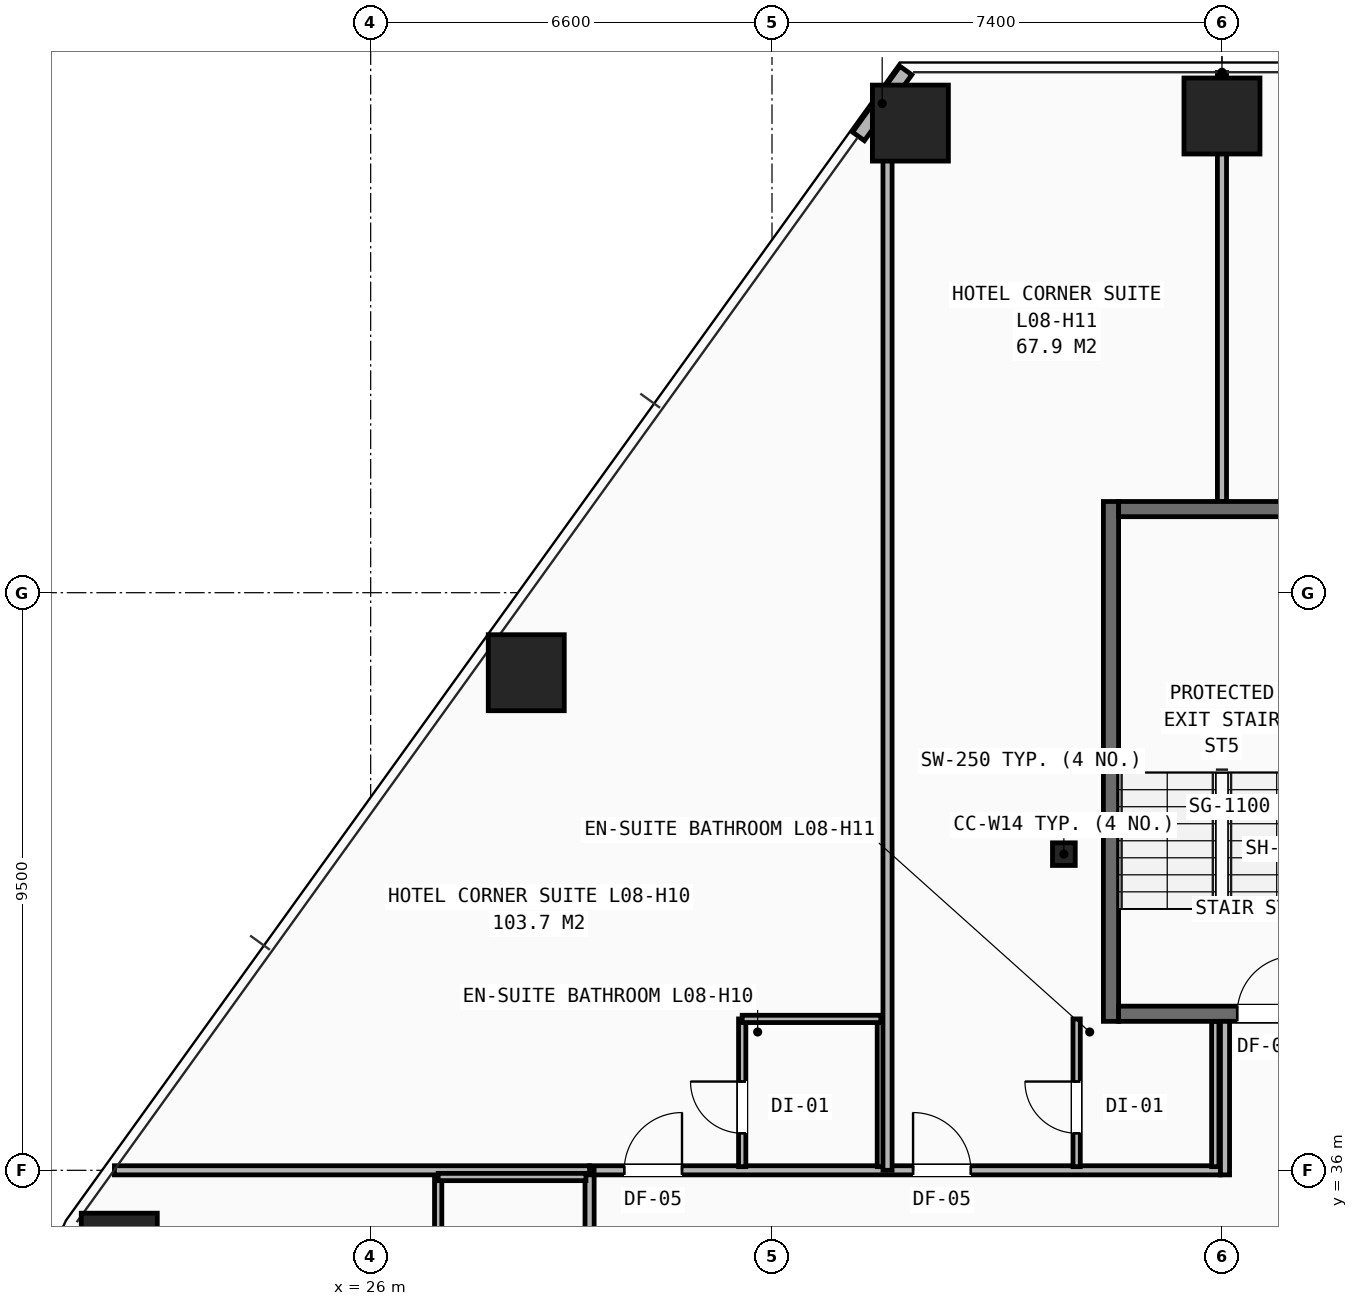
"""IFC4 building model, lengths in metres.
Left out: names, types, materials, properties, quantities, classifications, styles, units other than length and angle.
Written with IfcOpenShell. Run it as: python <this file> out.ifc"""

import sys

from ifc_helpers import new_model, si_unit, direction, frame, frame_2d, origin, origin_2d, place, context, subcontext, project, spatial, rectangle, hollow_rectangle, i_section, extrude, element, fill, save


model = new_model("IFC4")
c1 = context("Model", 3, precision=1e-05, world=origin(), true_north=direction((0.0, 1.0)))
c2 = subcontext(c1, "Body", "Model", "MODEL_VIEW")
j1 = project(units=[si_unit("LENGTHUNIT", "METRE"), si_unit("PLANEANGLEUNIT", "RADIAN")], contexts=[c1])
p1 = place(None, origin())
s1 = spatial("IfcSite", under=j1, at=p1, CompositionType="ELEMENT")
p2 = place(p1, origin())
s2 = spatial("IfcBuilding", under=s1, at=p2, CompositionType="ELEMENT")
p3 = place(p2, frame((0.0, 0.0, 33.6)))
s3 = spatial("IfcBuildingStorey", under=s2, at=p3, CompositionType="ELEMENT", Elevation=33.6)
p4 = place(p3, frame((37.4, 41.2, 0.0), z_axis=(0.0, 0.0, 1.0), x_axis=(1.0, 0.0, 0.0)))
e1 = element("IfcColumn", 1, at=p4, inside=s3, PredefinedType="COLUMN", context=c2, shape_type="SweptSolid", body=[
    extrude(i_section(OverallWidth=0.374, OverallDepth=0.372, WebThickness=0.016, FlangeThickness=0.026, at=origin_2d()), origin(), (0.0, 0.0, 1.0), 3.2),
])
for number, where, z_axis, x_axis in (
    (2, (40.0, 53.34, 0.0), (0.0, 0.0, 1.0), (1.0, 0.0, 0.0)),
    (3, (34.876, 53.223, 0.0), (0.0, 0.0, 1.0), (1.0, 0.0, 0.0)),
    (4, (28.559, 44.184, 0.0), (0.0, 0.0, 1.0), (1.0, 0.0, 0.0)),
    (5, (21.865, 34.67, 0.0), (0.0, 0.0, 1.0), (1.0, 0.0, 0.0)),
):
    element("IfcColumn", number, at=place(p3, frame(where, z_axis=z_axis, x_axis=x_axis)), inside=s3, PredefinedType="COLUMN", context=c2, shape_type="SweptSolid", body=[
        extrude(hollow_rectangle(XDim=1.25, YDim=1.25, WallThickness=0.08, at=origin_2d()), origin(), (0.0, 0.0, 1.0), 3.2),
    ])
p5 = place(p3, frame((34.802, 54.088, 0.0), z_axis=(0.0, 0.0, 1.0), x_axis=(-0.584193864266, -0.811614150292, 0.0)))
e6 = element("IfcWall", 6, at=p5, inside=s3, PredefinedType="SHEAR", context=c2, shape_type="SweptSolid", body=[
    extrude(rectangle(XDim=1.334, YDim=0.24, at=frame_2d((0.667, 0.0))), origin(), (0.0, 0.0, 1.0), 2.263),
])
p6 = place(p3, frame((29.6, 36.0, 0.0), z_axis=(0.0, 0.0, 1.0), x_axis=(1.0, 0.0, 0.0)))
e7 = element("IfcWall", 7, at=p6, inside=s3, PredefinedType="PARTITIONING", context=c2, shape_type="SweptSolid", body=[
    extrude(rectangle(XDim=10.375, YDim=0.15, at=frame_2d((5.188, 0.0))), origin(), (0.0, 0.0, 1.0), 2.98),
])
p7 = place(p6, frame((0.57, 0.0, 0.0)))
e8 = element("IfcOpeningElement", 8, at=p7, cuts=e7, PredefinedType="OPENING", context=c2, shape_type="SweptSolid", body=[
    extrude(rectangle(XDim=0.95, YDim=2.1, at=frame_2d((0.475, 1.05))), frame((0.0, 0.085, 0.0), z_axis=(0.0, -1.0, 0.0), x_axis=(1.0, 0.0, 0.0)), (0.0, 0.0, 1.0), 0.17),
])
p8 = place(p6, frame((5.32, 0.0, 0.0)))
e9 = element("IfcOpeningElement", 9, at=p8, cuts=e7, PredefinedType="OPENING", context=c2, shape_type="SweptSolid", body=[
    extrude(rectangle(XDim=0.95, YDim=2.1, at=frame_2d((0.475, 1.05))), frame((0.0, 0.085, 0.0), z_axis=(0.0, -1.0, 0.0), x_axis=(1.0, 0.0, 0.0)), (0.0, 0.0, 1.0), 0.17),
])
p9 = place(p3, frame((29.6, 14.1, 0.0), z_axis=(0.0, 0.0, 1.0), x_axis=(0.0, 1.0, 0.0)))
e10 = element("IfcWall", 10, at=p9, inside=s3, PredefinedType="PARTITIONING", context=c2, shape_type="SweptSolid", body=[
    extrude(rectangle(XDim=21.9, YDim=0.15, at=frame_2d((10.95, 0.0))), origin(), (0.0, 0.0, 1.0), 2.191),
])
p10 = place(p9, frame((0.42, 0.0, 0.0)))
e11 = element("IfcOpeningElement", 11, at=p10, cuts=e10, PredefinedType="OPENING", context=c2, shape_type="SweptSolid", body=[
    extrude(rectangle(XDim=0.95, YDim=2.1, at=frame_2d((0.475, 1.05))), frame((0.0, 0.085, 0.0), z_axis=(0.0, -1.0, 0.0), x_axis=(1.0, 0.0, 0.0)), (0.0, 0.0, 1.0), 0.17),
])
p11 = place(p9, frame((6.82, 0.0, 0.0)))
e12 = element("IfcOpeningElement", 12, at=p11, cuts=e10, PredefinedType="OPENING", context=c2, shape_type="SweptSolid", body=[
    extrude(rectangle(XDim=0.95, YDim=2.1, at=frame_2d((0.475, 1.05))), frame((0.0, 0.085, 0.0), z_axis=(0.0, -1.0, 0.0), x_axis=(1.0, 0.0, 0.0)), (0.0, 0.0, 1.0), 0.17),
])
p12 = place(p9, frame((14.32, 0.0, 0.0)))
e13 = element("IfcOpeningElement", 13, at=p12, cuts=e10, PredefinedType="OPENING", context=c2, shape_type="SweptSolid", body=[
    extrude(rectangle(XDim=0.95, YDim=2.1, at=frame_2d((0.475, 1.05))), frame((0.0, 0.085, 0.0), z_axis=(0.0, -1.0, 0.0), x_axis=(1.0, 0.0, 0.0)), (0.0, 0.0, 1.0), 0.17),
])
p13 = place(p3, frame((21.786, 36.0, 0.0), z_axis=(0.0, 0.0, 1.0), x_axis=(1.0, 0.0, 0.0)))
e14 = element("IfcWall", 14, at=p13, inside=s3, PredefinedType="PARTITIONING", context=c2, shape_type="SweptSolid", body=[
    extrude(rectangle(XDim=7.814, YDim=0.15, at=frame_2d((3.907, 0.0))), origin(), (0.0, 0.0, 1.0), 2.268),
])
p14 = place(p3, frame((27.11, 33.61, 0.0), z_axis=(0.0, 0.0, 1.0), x_axis=(0.0, 1.0, 0.0)))
e15 = element("IfcWall", 15, at=p14, inside=s3, PredefinedType="PARTITIONING", context=c2, shape_type="SweptSolid", body=[
    extrude(rectangle(XDim=2.28, YDim=0.12, at=frame_2d((1.14, 0.0))), origin(), (0.0, 0.0, 1.0), 2.513),
])
p15 = place(p3, frame((27.11, 35.89, 0.0), z_axis=(0.0, 0.0, 1.0), x_axis=(1.0, 0.0, 0.0)))
e16 = element("IfcWall", 16, at=p15, inside=s3, PredefinedType="PARTITIONING", context=c2, shape_type="SweptSolid", body=[
    extrude(rectangle(XDim=2.43, YDim=0.12, at=frame_2d((1.215, 0.0))), origin(), (0.0, 0.0, 1.0), 2.513),
])
p16 = place(p3, frame((32.11, 36.06, 0.0), z_axis=(0.0, 0.0, 1.0), x_axis=(0.0, 1.0, 0.0)))
e17 = element("IfcWall", 17, at=p16, inside=s3, PredefinedType="PARTITIONING", context=c2, shape_type="SweptSolid", body=[
    extrude(rectangle(XDim=2.43, YDim=0.12, at=frame_2d((1.215, 0.0))), origin(), (0.0, 0.0, 1.0), 2.98),
])
p17 = place(p16, frame((0.55, 0.0, 0.0)))
e18 = element("IfcOpeningElement", 18, at=p17, cuts=e17, PredefinedType="OPENING", context=c2, shape_type="SweptSolid", body=[
    extrude(rectangle(XDim=0.85, YDim=2.05, at=frame_2d((0.425, 1.025))), frame((0.0, 0.07, 0.0), z_axis=(0.0, -1.0, 0.0), x_axis=(1.0, 0.0, 0.0)), (0.0, 0.0, 1.0), 0.14),
])
p18 = place(p3, frame((34.39, 36.06, 0.0), z_axis=(0.0, 0.0, 1.0), x_axis=(0.0, 1.0, 0.0)))
e19 = element("IfcWall", 19, at=p18, inside=s3, PredefinedType="PARTITIONING", context=c2, shape_type="SweptSolid", body=[
    extrude(rectangle(XDim=2.43, YDim=0.12, at=frame_2d((1.215, 0.0))), origin(), (0.0, 0.0, 1.0), 2.98),
])
p19 = place(p3, frame((32.11, 38.49, 0.0), z_axis=(0.0, 0.0, 1.0), x_axis=(1.0, 0.0, 0.0)))
e20 = element("IfcWall", 20, at=p19, inside=s3, PredefinedType="PARTITIONING", context=c2, shape_type="SweptSolid", body=[
    extrude(rectangle(XDim=2.28, YDim=0.12, at=frame_2d((1.14, 0.0))), origin(), (0.0, 0.0, 1.0), 2.98),
])
p20 = place(p3, frame((34.5, 36.0, 0.0), z_axis=(0.0, 0.0, 1.0), x_axis=(0.0, 1.0, 0.0)))
e21 = element("IfcWall", 21, at=p20, inside=s3, PredefinedType="PARTITIONING", context=c2, shape_type="SweptSolid", body=[
    extrude(rectangle(XDim=17.66, YDim=0.15, at=frame_2d((8.83, 0.0))), origin(), (0.0, 0.0, 1.0), 2.191),
])
p21 = place(p3, frame((37.61, 36.06, 0.0), z_axis=(0.0, 0.0, 1.0), x_axis=(0.0, 1.0, 0.0)))
e22 = element("IfcWall", 22, at=p21, inside=s3, PredefinedType="PARTITIONING", context=c2, shape_type="SweptSolid", body=[
    extrude(rectangle(XDim=2.43, YDim=0.12, at=frame_2d((1.215, 0.0))), origin(), (0.0, 0.0, 1.0), 2.98),
])
p22 = place(p21, frame((0.55, 0.0, 0.0)))
e23 = element("IfcOpeningElement", 23, at=p22, cuts=e22, PredefinedType="OPENING", context=c2, shape_type="SweptSolid", body=[
    extrude(rectangle(XDim=0.85, YDim=2.05, at=frame_2d((0.425, 1.025))), frame((0.0, 0.07, 0.0), z_axis=(0.0, -1.0, 0.0), x_axis=(1.0, 0.0, 0.0)), (0.0, 0.0, 1.0), 0.14),
])
p23 = place(p3, frame((39.89, 36.06, 0.0), z_axis=(0.0, 0.0, 1.0), x_axis=(0.0, 1.0, 0.0)))
e24 = element("IfcWall", 24, at=p23, inside=s3, PredefinedType="PARTITIONING", context=c2, shape_type="SweptSolid", body=[
    extrude(rectangle(XDim=2.39, YDim=0.12, at=frame_2d((1.195, 0.0))), origin(), (0.0, 0.0, 1.0), 2.98),
])
p24 = place(p3, frame((40.0, 47.0, 0.0), z_axis=(0.0, 0.0, 1.0), x_axis=(0.0, 1.0, 0.0)))
e25 = element("IfcWall", 25, at=p24, inside=s3, PredefinedType="PARTITIONING", context=c2, shape_type="SweptSolid", body=[
    extrude(rectangle(XDim=7.055, YDim=0.15, at=frame_2d((3.528, 0.0))), origin(), (0.0, 0.0, 1.0), 2.268),
])
p25 = place(p3, frame((38.175, 38.45, 0.0), z_axis=(0.0, 0.0, 1.0), x_axis=(0.0, 1.0, 0.0)))
e26 = element("IfcWall", 26, at=p25, inside=s3, PredefinedType="SHEAR", context=c2, shape_type="SweptSolid", body=[
    extrude(rectangle(XDim=8.55, YDim=0.25, at=frame_2d((4.275, 0.0))), origin(), (0.0, 0.0, 1.0), 2.98),
])
p26 = place(p3, frame((38.3, 38.575, 0.0), z_axis=(0.0, 0.0, 1.0), x_axis=(1.0, 0.0, 0.0)))
e27 = element("IfcWall", 27, at=p26, inside=s3, PredefinedType="SHEAR", context=c2, shape_type="SweptSolid", body=[
    extrude(rectangle(XDim=3.4, YDim=0.25, at=frame_2d((1.7, 0.0))), origin(), (0.0, 0.0, 1.0), 2.98),
])
p27 = place(p26, frame((1.95, 0.0, 0.0)))
e28 = element("IfcOpeningElement", 28, at=p27, cuts=e27, PredefinedType="OPENING", context=c2, shape_type="SweptSolid", body=[
    extrude(rectangle(XDim=0.95, YDim=2.1, at=frame_2d((0.475, 1.05))), frame((0.0, 0.135, 0.0), z_axis=(0.0, -1.0, 0.0), x_axis=(1.0, 0.0, 0.0)), (0.0, 0.0, 1.0), 0.27),
])
p28 = place(p3, frame((38.3, 46.875, 0.0), z_axis=(0.0, 0.0, 1.0), x_axis=(1.0, 0.0, 0.0)))
e29 = element("IfcWall", 29, at=p28, inside=s3, PredefinedType="SHEAR", context=c2, shape_type="SweptSolid", body=[
    extrude(rectangle(XDim=3.4, YDim=0.25, at=frame_2d((1.7, 0.0))), origin(), (0.0, 0.0, 1.0), 2.98),
])
p29 = place(p3, frame((40.05, 35.925, 0.0), z_axis=(0.0, 0.0, 1.0), x_axis=(0.0, 1.0, 0.0)))
e30 = element("IfcWall", 30, at=p29, inside=s3, PredefinedType="PARTITIONING", context=c2, shape_type="SweptSolid", body=[
    extrude(rectangle(XDim=2.525, YDim=0.15, at=frame_2d((1.262, 0.0))), origin(), (0.0, 0.0, 1.0), 2.98),
])
p30 = place(p7, origin())
e31 = element("IfcDoor", 31, at=p30, inside=s3, OperationType="SINGLE_SWING_RIGHT", PredefinedType="DOOR", context=c2, shape_type="SweptSolid", body=[
    extrude(rectangle(XDim=0.95, YDim=2.1, at=frame_2d((0.475, 1.05))), frame((0.0, 0.025, 0.0), z_axis=(0.0, -1.0, 0.0), x_axis=(1.0, 0.0, 0.0)), (0.0, 0.0, 1.0), 0.05),
])
fill(e8, e31)
p31 = place(p17, origin())
e32 = element("IfcDoor", 32, at=p31, inside=s3, OperationType="SINGLE_SWING_RIGHT", PredefinedType="DOOR", context=c2, shape_type="SweptSolid", body=[
    extrude(rectangle(XDim=0.85, YDim=2.05, at=frame_2d((0.425, 1.025))), frame((0.0, 0.025, 0.0), z_axis=(0.0, -1.0, 0.0), x_axis=(1.0, 0.0, 0.0)), (0.0, 0.0, 1.0), 0.05),
])
fill(e18, e32)
p32 = place(p8, origin())
e33 = element("IfcDoor", 33, at=p32, inside=s3, OperationType="SINGLE_SWING_LEFT", PredefinedType="DOOR", context=c2, shape_type="SweptSolid", body=[
    extrude(rectangle(XDim=0.95, YDim=2.1, at=frame_2d((0.475, 1.05))), frame((0.0, 0.025, 0.0), z_axis=(0.0, -1.0, 0.0), x_axis=(1.0, 0.0, 0.0)), (0.0, 0.0, 1.0), 0.05),
])
fill(e9, e33)
p33 = place(p22, origin())
e34 = element("IfcDoor", 34, at=p33, inside=s3, OperationType="SINGLE_SWING_RIGHT", PredefinedType="DOOR", context=c2, shape_type="SweptSolid", body=[
    extrude(rectangle(XDim=0.85, YDim=2.05, at=frame_2d((0.425, 1.025))), frame((0.0, 0.025, 0.0), z_axis=(0.0, -1.0, 0.0), x_axis=(1.0, 0.0, 0.0)), (0.0, 0.0, 1.0), 0.05),
])
fill(e23, e34)
p34 = place(p27, origin())
e35 = element("IfcDoor", 35, at=p34, inside=s3, OperationType="SINGLE_SWING_RIGHT", PredefinedType="DOOR", context=c2, shape_type="SweptSolid", body=[
    extrude(rectangle(XDim=0.95, YDim=2.1, at=frame_2d((0.475, 1.05))), frame((0.0, 0.025, 0.0), z_axis=(0.0, -1.0, 0.0), x_axis=(1.0, 0.0, 0.0)), (0.0, 0.0, 1.0), 0.05),
])
fill(e28, e35)
save(model, sys.argv[1])
